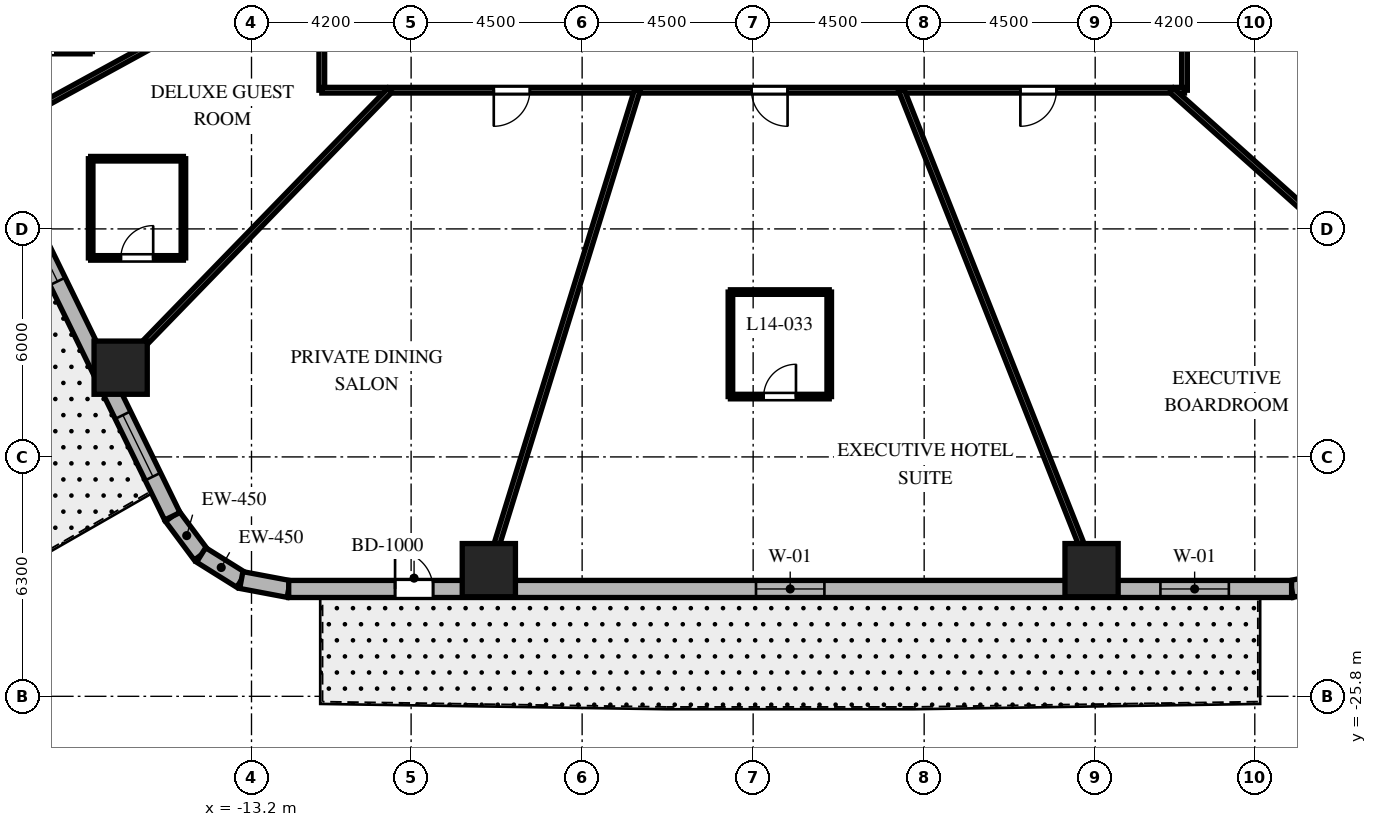
"""IFC4 building model, lengths in metres.
Left out: names, types, materials, properties, quantities, classifications, styles, units other than length and angle.
Written with IfcOpenShell. Run it as: python <this file> out.ifc"""

import sys

from ifc_helpers import new_model, si_unit, direction, frame, frame_2d, origin, origin_2d, place, context, subcontext, project, spatial, rectangle, extrude, element, fill, save


model = new_model("IFC4")
c1 = context("Model", 3, precision=1e-05, world=origin(), true_north=direction((0.0, 1.0)))
c2 = subcontext(c1, "Body", "Model", "MODEL_VIEW")
j1 = project(units=[si_unit("LENGTHUNIT", "METRE"), si_unit("PLANEANGLEUNIT", "RADIAN")], contexts=[c1])
p1 = place(None, origin())
s1 = spatial("IfcSite", under=j1, at=p1, CompositionType="ELEMENT")
p2 = place(p1, origin())
s2 = spatial("IfcBuilding", under=s1, at=p2, CompositionType="ELEMENT")
p3 = place(p2, frame((0.0, 0.0, 63.8)))
s3 = spatial("IfcBuildingStorey", under=s2, at=p3, CompositionType="ELEMENT", Elevation=63.8)
for number, where, z_axis, x_axis in (
    (1, (-6.955, -22.48, 0.0), (0.0, 0.0, 1.0), (1.0, 0.0, 0.0)),
    (2, (8.905, -22.48, 0.0), (0.0, 0.0, 1.0), (1.0, 0.0, 0.0)),
    (3, (-16.643, -17.152, 0.0), (0.0, 0.0, 1.0), (1.0, 0.0, 0.0)),
):
    element("IfcColumn", number, at=place(p3, frame(where, z_axis=z_axis, x_axis=x_axis)), inside=s3, PredefinedType="COLUMN", context=c2, shape_type="SweptSolid", body=[
        extrude(rectangle(XDim=1.4, YDim=1.4, at=origin_2d()), origin(), (0.0, 0.0, 1.0), 3.7),
    ])
p4 = place(p3, frame((-15.284, -21.062, 0.0), z_axis=(0.0, 0.0, 1.0), x_axis=(0.597595366449, -0.801797841104, 0.0)))
e4 = element("IfcWall", 4, at=p4, inside=s3, PredefinedType="SOLIDWALL", context=c2, shape_type="SweptSolid", body=[
    extrude(rectangle(XDim=1.269, YDim=0.45, at=frame_2d((0.634, 0.0))), origin(), (0.0, 0.0, 1.0), 3.4),
])
p5 = place(p3, frame((-14.526, -22.08, 0.0), z_axis=(0.0, 0.0, 1.0), x_axis=(0.848185203596, -0.529699783275, 0.0)))
e5 = element("IfcWall", 5, at=p5, inside=s3, PredefinedType="SOLIDWALL", context=c2, shape_type="SweptSolid", body=[
    extrude(rectangle(XDim=1.247, YDim=0.45, at=frame_2d((0.624, 0.0))), origin(), (0.0, 0.0, 1.0), 3.4),
])
p6 = place(p3, frame((-13.468, -22.74, 0.0), z_axis=(0.0, 0.0, 1.0), x_axis=(0.982717174228, -0.185113358451, 0.0)))
e6 = element("IfcWall", 6, at=p6, inside=s3, PredefinedType="SOLIDWALL", context=c2, shape_type="SweptSolid", body=[
    extrude(rectangle(XDim=1.269, YDim=0.45, at=frame_2d((0.634, 0.0))), origin(), (0.0, 0.0, 1.0), 3.4),
])
p7 = place(p3, frame((14.168, -22.975, 0.0), z_axis=(0.0, 0.0, 1.0), x_axis=(0.978770371074, 0.204959900243, 0.0)))
e7 = element("IfcWall", 7, at=p7, inside=s3, PredefinedType="SOLIDWALL", context=c2, shape_type="SweptSolid", body=[
    extrude(rectangle(XDim=1.406, YDim=0.45, at=frame_2d((0.703, 0.0))), origin(), (0.0, 0.0, 1.0), 3.4),
])
p8 = place(p3, frame((-12.221, -22.975, 0.0), z_axis=(0.0, 0.0, 1.0), x_axis=(1.0, 0.0, 0.0)))
e8 = element("IfcWall", 8, at=p8, inside=s3, PredefinedType="SOLIDWALL", context=c2, shape_type="SweptSolid", body=[
    extrude(rectangle(XDim=26.389, YDim=0.45, at=frame_2d((13.195, 0.0))), origin(), (0.0, 0.0, 1.0), 3.4),
])
p9 = place(p8, frame((2.799, 0.0, 0.0)))
e9 = element("IfcOpeningElement", 9, at=p9, cuts=e8, PredefinedType="OPENING", context=c2, shape_type="SweptSolid", body=[
    extrude(rectangle(XDim=1.0, YDim=2.15, at=frame_2d((0.5, 1.075))), frame((0.0, 0.235, 0.0), z_axis=(0.0, -1.0, 0.0), x_axis=(1.0, 0.0, 0.0)), (0.0, 0.0, 1.0), 0.47),
])
p10 = place(p8, frame((12.296, 0.0, 0.8)))
e10 = element("IfcOpeningElement", 10, at=p10, cuts=e8, PredefinedType="OPENING", context=c2, shape_type="SweptSolid", body=[
    extrude(rectangle(XDim=1.8, YDim=1.8, at=frame_2d((0.9, 0.9))), frame((0.0, 0.235, 0.0), z_axis=(0.0, -1.0, 0.0), x_axis=(1.0, 0.0, 0.0)), (0.0, 0.0, 1.0), 0.47),
])
p11 = place(p8, frame((22.938, 0.0, 0.8)))
e11 = element("IfcOpeningElement", 11, at=p11, cuts=e8, PredefinedType="OPENING", context=c2, shape_type="SweptSolid", body=[
    extrude(rectangle(XDim=1.8, YDim=1.8, at=frame_2d((0.9, 0.9))), frame((0.0, 0.235, 0.0), z_axis=(0.0, -1.0, 0.0), x_axis=(1.0, 0.0, 0.0)), (0.0, 0.0, 1.0), 0.47),
])
p12 = place(p3, frame((-24.336, -2.532, 0.0), z_axis=(0.0, 0.0, 1.0), x_axis=(0.438931326393, -0.898520612291, 0.0)))
e12 = element("IfcWall", 12, at=p12, inside=s3, PredefinedType="SOLIDWALL", context=c2, shape_type="SweptSolid", body=[
    extrude(rectangle(XDim=20.623, YDim=0.45, at=frame_2d((10.312, 0.0))), origin(), (0.0, 0.0, 1.0), 3.4),
])
p13 = place(p12, frame((5.171, 0.0, 0.0)))
e13 = element("IfcOpeningElement", 13, at=p13, cuts=e12, PredefinedType="OPENING", context=c2, shape_type="SweptSolid", body=[
    extrude(rectangle(XDim=0.95, YDim=2.15, at=frame_2d((0.475, 1.075))), frame((0.0, 0.235, 0.0), z_axis=(0.0, -1.0, 0.0), x_axis=(1.0, 0.0, 0.0)), (0.0, 0.0, 1.0), 0.47),
])
p14 = place(p12, frame((1.214, 0.0, 0.8)))
e14 = element("IfcOpeningElement", 14, at=p14, cuts=e12, PredefinedType="OPENING", context=c2, shape_type="SweptSolid", body=[
    extrude(rectangle(XDim=1.8, YDim=1.8, at=frame_2d((0.9, 0.9))), frame((0.0, 0.235, 0.0), z_axis=(0.0, -1.0, 0.0), x_axis=(1.0, 0.0, 0.0)), (0.0, 0.0, 1.0), 0.47),
])
p15 = place(p12, frame((6.8, 0.0, 0.8)))
e15 = element("IfcOpeningElement", 15, at=p15, cuts=e12, PredefinedType="OPENING", context=c2, shape_type="SweptSolid", body=[
    extrude(rectangle(XDim=1.8, YDim=1.8, at=frame_2d((0.9, 0.9))), frame((0.0, 0.235, 0.0), z_axis=(0.0, -1.0, 0.0), x_axis=(1.0, 0.0, 0.0)), (0.0, 0.0, 1.0), 0.47),
])
p16 = place(p12, frame((11.942, 0.0, 0.8)))
e16 = element("IfcOpeningElement", 16, at=p16, cuts=e12, PredefinedType="OPENING", context=c2, shape_type="SweptSolid", body=[
    extrude(rectangle(XDim=1.8, YDim=1.8, at=frame_2d((0.9, 0.9))), frame((0.0, 0.235, 0.0), z_axis=(0.0, -1.0, 0.0), x_axis=(1.0, 0.0, 0.0)), (0.0, 0.0, 1.0), 0.47),
])
p17 = place(p12, frame((17.66, 0.0, 0.8)))
e17 = element("IfcOpeningElement", 17, at=p17, cuts=e12, PredefinedType="OPENING", context=c2, shape_type="SweptSolid", body=[
    extrude(rectangle(XDim=1.8, YDim=1.8, at=frame_2d((0.9, 0.9))), frame((0.0, 0.235, 0.0), z_axis=(0.0, -1.0, 0.0), x_axis=(1.0, 0.0, 0.0)), (0.0, 0.0, 1.0), 0.47),
])
p18 = place(p3, frame((-11.35, -9.85, 0.0), z_axis=(0.0, 0.0, 1.0), x_axis=(0.0, 1.0, 0.0)))
e18 = element("IfcWall", 18, at=p18, inside=s3, PredefinedType="PARTITIONING", context=c2, shape_type="SweptSolid", body=[
    extrude(rectangle(XDim=19.7, YDim=0.15, at=frame_2d((9.85, 0.0))), origin(), (0.0, 0.0, 1.0), 2.84),
])
p19 = place(p18, frame((15.191, 0.0, 0.0)))
e19 = element("IfcOpeningElement", 19, at=p19, cuts=e18, PredefinedType="OPENING", context=c2, shape_type="SweptSolid", body=[
    extrude(rectangle(XDim=0.95, YDim=2.03, at=frame_2d((0.475, 1.015))), frame((0.0, 0.085, 0.0), z_axis=(0.0, -1.0, 0.0), x_axis=(1.0, 0.0, 0.0)), (0.0, 0.0, 1.0), 0.17),
])
p20 = place(p18, frame((8.838, 0.0, 0.0)))
e20 = element("IfcOpeningElement", 20, at=p20, cuts=e18, PredefinedType="OPENING", context=c2, shape_type="SweptSolid", body=[
    extrude(rectangle(XDim=0.95, YDim=2.03, at=frame_2d((0.475, 1.015))), frame((0.0, 0.085, 0.0), z_axis=(0.0, -1.0, 0.0), x_axis=(1.0, 0.0, 0.0)), (0.0, 0.0, 1.0), 0.17),
])
p21 = place(p18, frame((4.704, 0.0, 0.0)))
e21 = element("IfcOpeningElement", 21, at=p21, cuts=e18, PredefinedType="OPENING", context=c2, shape_type="SweptSolid", body=[
    extrude(rectangle(XDim=0.95, YDim=2.03, at=frame_2d((0.475, 1.015))), frame((0.0, 0.085, 0.0), z_axis=(0.0, -1.0, 0.0), x_axis=(1.0, 0.0, 0.0)), (0.0, 0.0, 1.0), 0.17),
])
p22 = place(p18, frame((1.462, 0.0, 0.0)))
e22 = element("IfcOpeningElement", 22, at=p22, cuts=e18, PredefinedType="OPENING", context=c2, shape_type="SweptSolid", body=[
    extrude(rectangle(XDim=0.95, YDim=2.03, at=frame_2d((0.475, 1.015))), frame((0.0, 0.085, 0.0), z_axis=(0.0, -1.0, 0.0), x_axis=(1.0, 0.0, 0.0)), (0.0, 0.0, 1.0), 0.17),
])
p23 = place(p3, frame((11.35, 9.85, 0.0), z_axis=(0.0, 0.0, 1.0), x_axis=(0.0, -1.0, 0.0)))
e23 = element("IfcWall", 23, at=p23, inside=s3, PredefinedType="PARTITIONING", context=c2, shape_type="SweptSolid", body=[
    extrude(rectangle(XDim=19.7, YDim=0.15, at=frame_2d((9.85, 0.0))), origin(), (0.0, 0.0, 1.0), 2.84),
])
p24 = place(p23, frame((4.704, 0.0, 0.0)))
e24 = element("IfcOpeningElement", 24, at=p24, cuts=e23, PredefinedType="OPENING", context=c2, shape_type="SweptSolid", body=[
    extrude(rectangle(XDim=0.95, YDim=2.03, at=frame_2d((0.475, 1.015))), frame((0.0, 0.085, 0.0), z_axis=(0.0, -1.0, 0.0), x_axis=(1.0, 0.0, 0.0)), (0.0, 0.0, 1.0), 0.17),
])
p25 = place(p23, frame((1.462, 0.0, 0.0)))
e25 = element("IfcOpeningElement", 25, at=p25, cuts=e23, PredefinedType="OPENING", context=c2, shape_type="SweptSolid", body=[
    extrude(rectangle(XDim=0.95, YDim=2.03, at=frame_2d((0.475, 1.015))), frame((0.0, 0.085, 0.0), z_axis=(0.0, -1.0, 0.0), x_axis=(1.0, 0.0, 0.0)), (0.0, 0.0, 1.0), 0.17),
])
p26 = place(p23, frame((15.191, 0.0, 0.0)))
e26 = element("IfcOpeningElement", 26, at=p26, cuts=e23, PredefinedType="OPENING", context=c2, shape_type="SweptSolid", body=[
    extrude(rectangle(XDim=0.95, YDim=2.03, at=frame_2d((0.475, 1.015))), frame((0.0, 0.085, 0.0), z_axis=(0.0, -1.0, 0.0), x_axis=(1.0, 0.0, 0.0)), (0.0, 0.0, 1.0), 0.17),
])
p27 = place(p23, frame((8.838, 0.0, 0.0)))
e27 = element("IfcOpeningElement", 27, at=p27, cuts=e23, PredefinedType="OPENING", context=c2, shape_type="SweptSolid", body=[
    extrude(rectangle(XDim=0.95, YDim=2.03, at=frame_2d((0.475, 1.015))), frame((0.0, 0.085, 0.0), z_axis=(0.0, -1.0, 0.0), x_axis=(1.0, 0.0, 0.0)), (0.0, 0.0, 1.0), 0.17),
])
p28 = place(p3, frame((11.35, -9.85, 0.0), z_axis=(0.0, 0.0, 1.0), x_axis=(-1.0, 0.0, 0.0)))
e28 = element("IfcWall", 28, at=p28, inside=s3, PredefinedType="PARTITIONING", context=c2, shape_type="SweptSolid", body=[
    extrude(rectangle(XDim=22.7, YDim=0.15, at=frame_2d((11.35, 0.0))), origin(), (0.0, 0.0, 1.0), 2.84),
])
p29 = place(p28, frame((17.225, 0.0, 0.0)))
e29 = element("IfcOpeningElement", 29, at=p29, cuts=e28, PredefinedType="OPENING", context=c2, shape_type="SweptSolid", body=[
    extrude(rectangle(XDim=0.95, YDim=2.03, at=frame_2d((0.475, 1.015))), frame((0.0, 0.085, 0.0), z_axis=(0.0, -1.0, 0.0), x_axis=(1.0, 0.0, 0.0)), (0.0, 0.0, 1.0), 0.17),
])
p30 = place(p28, frame((10.444, 0.0, 0.0)))
e30 = element("IfcOpeningElement", 30, at=p30, cuts=e28, PredefinedType="OPENING", context=c2, shape_type="SweptSolid", body=[
    extrude(rectangle(XDim=0.95, YDim=2.03, at=frame_2d((0.475, 1.015))), frame((0.0, 0.085, 0.0), z_axis=(0.0, -1.0, 0.0), x_axis=(1.0, 0.0, 0.0)), (0.0, 0.0, 1.0), 0.17),
])
p31 = place(p28, frame((3.369, 0.0, 0.0)))
e31 = element("IfcOpeningElement", 31, at=p31, cuts=e28, PredefinedType="OPENING", context=c2, shape_type="SweptSolid", body=[
    extrude(rectangle(XDim=0.95, YDim=2.03, at=frame_2d((0.475, 1.015))), frame((0.0, 0.085, 0.0), z_axis=(0.0, -1.0, 0.0), x_axis=(1.0, 0.0, 0.0)), (0.0, 0.0, 1.0), 0.17),
])
p32 = place(p3, frame((-11.35, -6.217, 0.0), z_axis=(0.0, 0.0, 1.0), x_axis=(-0.877047587135, -0.480403507378, 0.0)))
e32 = element("IfcWall", 32, at=p32, inside=s3, PredefinedType="PARTITIONING", context=c2, shape_type="SweptSolid", body=[
    extrude(rectangle(XDim=10.062, YDim=0.15, at=frame_2d((5.031, 0.0))), origin(), (0.0, 0.0, 1.0), 2.54),
])
p33 = place(p3, frame((-9.558, -9.85, 0.0), z_axis=(0.0, 0.0, 1.0), x_axis=(-0.69638346089, -0.717669893056, 0.0)))
e33 = element("IfcWall", 33, at=p33, inside=s3, PredefinedType="PARTITIONING", context=c2, shape_type="SweptSolid", body=[
    extrude(rectangle(XDim=10.701, YDim=0.15, at=frame_2d((5.351, 0.0))), origin(), (0.0, 0.0, 1.0), 2.54),
])
p34 = place(p3, frame((-3.048, -9.85, 0.0), z_axis=(0.0, 0.0, 1.0), x_axis=(-0.295553992761, -0.955326037206, 0.0)))
e34 = element("IfcWall", 34, at=p34, inside=s3, PredefinedType="PARTITIONING", context=c2, shape_type="SweptSolid", body=[
    extrude(rectangle(XDim=13.739, YDim=0.15, at=frame_2d((6.869, 0.0))), origin(), (0.0, 0.0, 1.0), 2.54),
])
p35 = place(p3, frame((3.902, -9.85, 0.0), z_axis=(0.0, 0.0, 1.0), x_axis=(0.36828765711, -0.929711891728, 0.0)))
e35 = element("IfcWall", 35, at=p35, inside=s3, PredefinedType="PARTITIONING", context=c2, shape_type="SweptSolid", body=[
    extrude(rectangle(XDim=14.117, YDim=0.15, at=frame_2d((7.059, 0.0))), origin(), (0.0, 0.0, 1.0), 2.54),
])
p36 = place(p3, frame((11.007, -9.85, 0.0), z_axis=(0.0, 0.0, 1.0), x_axis=(0.745177305978, -0.666866390407, 0.0)))
e36 = element("IfcWall", 36, at=p36, inside=s3, PredefinedType="PARTITIONING", context=c2, shape_type="SweptSolid", body=[
    extrude(rectangle(XDim=10.375, YDim=0.15, at=frame_2d((5.188, 0.0))), origin(), (0.0, 0.0, 1.0), 2.54),
])
p37 = place(p3, frame((-20.127, -8.833, 0.0), z_axis=(0.0, 0.0, 1.0), x_axis=(1.0, 0.0, 0.0)))
e37 = element("IfcWall", 37, at=p37, inside=s3, PredefinedType="PARTITIONING", context=c2, shape_type="SweptSolid", body=[
    extrude(rectangle(XDim=2.68, YDim=0.12, at=frame_2d((1.34, 0.0))), origin(), (0.0, 0.0, 1.0), 3.4),
])
p38 = place(p37, frame((0.915, 0.0, 0.0)))
e38 = element("IfcOpeningElement", 38, at=p38, cuts=e37, PredefinedType="OPENING", context=c2, shape_type="SweptSolid", body=[
    extrude(rectangle(XDim=0.85, YDim=2.03, at=frame_2d((0.425, 1.015))), frame((0.0, 0.07, 0.0), z_axis=(0.0, -1.0, 0.0), x_axis=(1.0, 0.0, 0.0)), (0.0, 0.0, 1.0), 0.14),
])
p39 = place(p3, frame((-17.432, -14.263, 0.0), z_axis=(0.0, 0.0, 1.0), x_axis=(1.0, 0.0, 0.0)))
e39 = element("IfcWall", 39, at=p39, inside=s3, PredefinedType="PARTITIONING", context=c2, shape_type="SweptSolid", body=[
    extrude(rectangle(XDim=2.44, YDim=0.12, at=frame_2d((1.22, 0.0))), origin(), (0.0, 0.0, 1.0), 3.4),
])
p40 = place(p39, frame((0.795, 0.0, 0.0)))
e40 = element("IfcOpeningElement", 40, at=p40, cuts=e39, PredefinedType="OPENING", context=c2, shape_type="SweptSolid", body=[
    extrude(rectangle(XDim=0.85, YDim=2.03, at=frame_2d((0.425, 1.015))), frame((0.0, 0.07, 0.0), z_axis=(0.0, -1.0, 0.0), x_axis=(1.0, 0.0, 0.0)), (0.0, 0.0, 1.0), 0.14),
])
p41 = place(p3, frame((-14.992, -14.263, 0.0), z_axis=(0.0, 0.0, 1.0), x_axis=(0.0, 1.0, 0.0)))
e41 = element("IfcWall", 41, at=p41, inside=s3, PredefinedType="PARTITIONING", context=c2, shape_type="SweptSolid", body=[
    extrude(rectangle(XDim=2.61, YDim=0.12, at=frame_2d((1.305, 0.0))), origin(), (0.0, 0.0, 1.0), 2.927),
])
p42 = place(p3, frame((-14.992, -11.653, 0.0), z_axis=(0.0, 0.0, 1.0), x_axis=(-1.0, 0.0, 0.0)))
e42 = element("IfcWall", 42, at=p42, inside=s3, PredefinedType="PARTITIONING", context=c2, shape_type="SweptSolid", body=[
    extrude(rectangle(XDim=2.44, YDim=0.12, at=frame_2d((1.22, 0.0))), origin(), (0.0, 0.0, 1.0), 2.927),
])
p43 = place(p3, frame((-17.432, -11.653, 0.0), z_axis=(0.0, 0.0, 1.0), x_axis=(0.0, -1.0, 0.0)))
e43 = element("IfcWall", 43, at=p43, inside=s3, PredefinedType="PARTITIONING", context=c2, shape_type="SweptSolid", body=[
    extrude(rectangle(XDim=2.61, YDim=0.12, at=frame_2d((1.305, 0.0))), origin(), (0.0, 0.0, 1.0), 3.4),
])
p44 = place(p3, frame((-0.598, -17.912, 0.0), z_axis=(0.0, 0.0, 1.0), x_axis=(1.0, 0.0, 0.0)))
e44 = element("IfcWall", 44, at=p44, inside=s3, PredefinedType="PARTITIONING", context=c2, shape_type="SweptSolid", body=[
    extrude(rectangle(XDim=2.6, YDim=0.12, at=frame_2d((1.3, 0.0))), origin(), (0.0, 0.0, 1.0), 3.4),
])
p45 = place(p44, frame((0.875, 0.0, 0.0)))
e45 = element("IfcOpeningElement", 45, at=p45, cuts=e44, PredefinedType="OPENING", context=c2, shape_type="SweptSolid", body=[
    extrude(rectangle(XDim=0.85, YDim=2.03, at=frame_2d((0.425, 1.015))), frame((0.0, 0.07, 0.0), z_axis=(0.0, -1.0, 0.0), x_axis=(1.0, 0.0, 0.0)), (0.0, 0.0, 1.0), 0.14),
])
p46 = place(p3, frame((2.002, -17.912, 0.0), z_axis=(0.0, 0.0, 1.0), x_axis=(0.0, 1.0, 0.0)))
e46 = element("IfcWall", 46, at=p46, inside=s3, PredefinedType="PARTITIONING", context=c2, shape_type="SweptSolid", body=[
    extrude(rectangle(XDim=2.75, YDim=0.12, at=frame_2d((1.375, 0.0))), origin(), (0.0, 0.0, 1.0), 2.84),
])
p47 = place(p3, frame((2.002, -15.162, 0.0), z_axis=(0.0, 0.0, 1.0), x_axis=(-1.0, 0.0, 0.0)))
e47 = element("IfcWall", 47, at=p47, inside=s3, PredefinedType="PARTITIONING", context=c2, shape_type="SweptSolid", body=[
    extrude(rectangle(XDim=2.6, YDim=0.12, at=frame_2d((1.3, 0.0))), origin(), (0.0, 0.0, 1.0), 3.4),
])
p48 = place(p3, frame((-0.598, -15.162, 0.0), z_axis=(0.0, 0.0, 1.0), x_axis=(0.0, -1.0, 0.0)))
e48 = element("IfcWall", 48, at=p48, inside=s3, PredefinedType="PARTITIONING", context=c2, shape_type="SweptSolid", body=[
    extrude(rectangle(XDim=2.75, YDim=0.12, at=frame_2d((1.375, 0.0))), origin(), (0.0, 0.0, 1.0), 2.84),
])
p49 = place(p9, origin())
e49 = element("IfcDoor", 49, at=p49, inside=s3, OperationType="SINGLE_SWING_LEFT", PredefinedType="DOOR", context=c2, shape_type="SweptSolid", body=[
    extrude(rectangle(XDim=1.0, YDim=2.15, at=frame_2d((0.5, 1.075))), frame((0.0, 0.025, 0.0), z_axis=(0.0, -1.0, 0.0), x_axis=(1.0, 0.0, 0.0)), (0.0, 0.0, 1.0), 0.05),
])
fill(e9, e49)
p50 = place(p10, origin())
e50 = element("IfcWindow", 50, at=p50, inside=s3, PartitioningType="SINGLE_PANEL", PredefinedType="WINDOW", context=c2, shape_type="SweptSolid", body=[
    extrude(rectangle(XDim=1.8, YDim=1.8, at=frame_2d((0.9, 0.9))), frame((0.0, 0.03, 0.0), z_axis=(0.0, -1.0, 0.0), x_axis=(1.0, 0.0, 0.0)), (0.0, 0.0, 1.0), 0.06),
])
fill(e10, e50)
p51 = place(p11, origin())
e51 = element("IfcWindow", 51, at=p51, inside=s3, PartitioningType="SINGLE_PANEL", PredefinedType="WINDOW", context=c2, shape_type="SweptSolid", body=[
    extrude(rectangle(XDim=1.8, YDim=1.8, at=frame_2d((0.9, 0.9))), frame((0.0, 0.03, 0.0), z_axis=(0.0, -1.0, 0.0), x_axis=(1.0, 0.0, 0.0)), (0.0, 0.0, 1.0), 0.06),
])
fill(e11, e51)
p52 = place(p16, origin())
e52 = element("IfcWindow", 52, at=p52, inside=s3, PartitioningType="SINGLE_PANEL", PredefinedType="WINDOW", context=c2, shape_type="SweptSolid", body=[
    extrude(rectangle(XDim=1.8, YDim=1.8, at=frame_2d((0.9, 0.9))), frame((0.0, 0.03, 0.0), z_axis=(0.0, -1.0, 0.0), x_axis=(1.0, 0.0, 0.0)), (0.0, 0.0, 1.0), 0.06),
])
fill(e16, e52)
p53 = place(p17, origin())
e53 = element("IfcWindow", 53, at=p53, inside=s3, PartitioningType="SINGLE_PANEL", PredefinedType="WINDOW", context=c2, shape_type="SweptSolid", body=[
    extrude(rectangle(XDim=1.8, YDim=1.8, at=frame_2d((0.9, 0.9))), frame((0.0, 0.03, 0.0), z_axis=(0.0, -1.0, 0.0), x_axis=(1.0, 0.0, 0.0)), (0.0, 0.0, 1.0), 0.06),
])
fill(e17, e53)
p54 = place(p38, origin())
e54 = element("IfcDoor", 54, at=p54, inside=s3, OperationType="SINGLE_SWING_LEFT", PredefinedType="DOOR", context=c2, shape_type="SweptSolid", body=[
    extrude(rectangle(XDim=0.85, YDim=2.03, at=frame_2d((0.425, 1.015))), frame((0.0, 0.025, 0.0), z_axis=(0.0, -1.0, 0.0), x_axis=(1.0, 0.0, 0.0)), (0.0, 0.0, 1.0), 0.05),
])
fill(e38, e54)
p55 = place(p40, origin())
e55 = element("IfcDoor", 55, at=p55, inside=s3, OperationType="SINGLE_SWING_RIGHT", PredefinedType="DOOR", context=c2, shape_type="SweptSolid", body=[
    extrude(rectangle(XDim=0.85, YDim=2.03, at=frame_2d((0.425, 1.015))), frame((0.0, 0.025, 0.0), z_axis=(0.0, -1.0, 0.0), x_axis=(1.0, 0.0, 0.0)), (0.0, 0.0, 1.0), 0.05),
])
fill(e40, e55)
p56 = place(p29, origin())
e56 = element("IfcDoor", 56, at=p56, inside=s3, OperationType="SINGLE_SWING_RIGHT", PredefinedType="DOOR", context=c2, shape_type="SweptSolid", body=[
    extrude(rectangle(XDim=0.95, YDim=2.03, at=frame_2d((0.475, 1.015))), frame((0.0, 0.025, 0.0), z_axis=(0.0, -1.0, 0.0), x_axis=(1.0, 0.0, 0.0)), (0.0, 0.0, 1.0), 0.05),
])
fill(e29, e56)
p57 = place(p30, origin())
e57 = element("IfcDoor", 57, at=p57, inside=s3, OperationType="SINGLE_SWING_LEFT", PredefinedType="DOOR", context=c2, shape_type="SweptSolid", body=[
    extrude(rectangle(XDim=0.95, YDim=2.03, at=frame_2d((0.475, 1.015))), frame((0.0, 0.025, 0.0), z_axis=(0.0, -1.0, 0.0), x_axis=(1.0, 0.0, 0.0)), (0.0, 0.0, 1.0), 0.05),
])
fill(e30, e57)
p58 = place(p45, origin())
e58 = element("IfcDoor", 58, at=p58, inside=s3, OperationType="SINGLE_SWING_RIGHT", PredefinedType="DOOR", context=c2, shape_type="SweptSolid", body=[
    extrude(rectangle(XDim=0.85, YDim=2.03, at=frame_2d((0.425, 1.015))), frame((0.0, 0.025, 0.0), z_axis=(0.0, -1.0, 0.0), x_axis=(1.0, 0.0, 0.0)), (0.0, 0.0, 1.0), 0.05),
])
fill(e45, e58)
p59 = place(p31, origin())
e59 = element("IfcDoor", 59, at=p59, inside=s3, OperationType="SINGLE_SWING_RIGHT", PredefinedType="DOOR", context=c2, shape_type="SweptSolid", body=[
    extrude(rectangle(XDim=0.95, YDim=2.03, at=frame_2d((0.475, 1.015))), frame((0.0, 0.025, 0.0), z_axis=(0.0, -1.0, 0.0), x_axis=(1.0, 0.0, 0.0)), (0.0, 0.0, 1.0), 0.05),
])
fill(e31, e59)
save(model, sys.argv[1])
